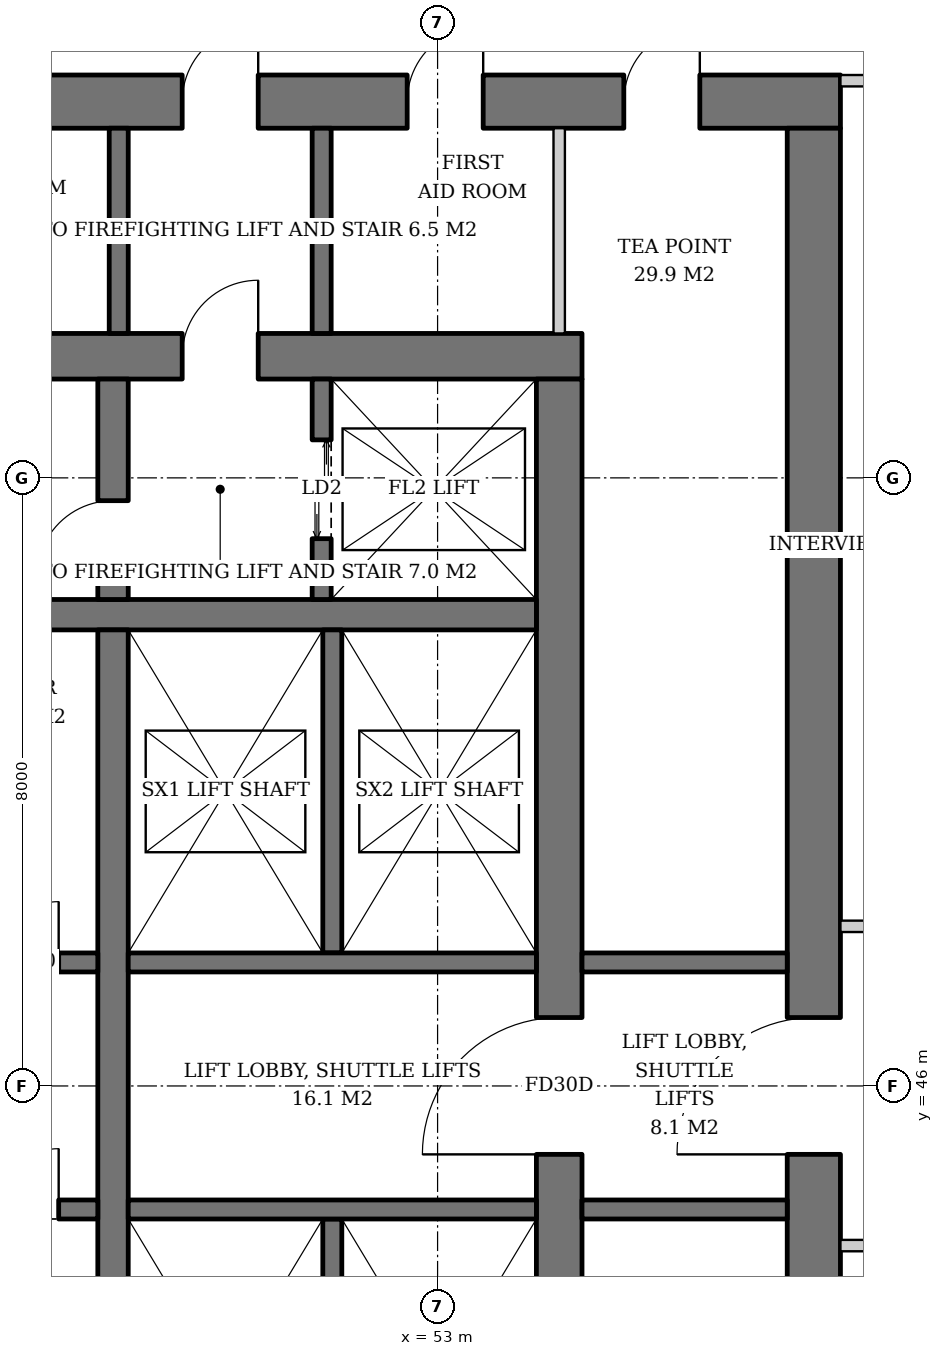
"""IFC4 building model, lengths in metres.
Left out: names, types, materials, properties, quantities, classifications, styles, units other than length and angle.
Written with IfcOpenShell. Run it as: python <this file> out.ifc"""

import sys

from ifc_helpers import new_model, si_unit, direction, frame, frame_2d, origin, place, context, subcontext, project, spatial, rectangle, extrude, element, fill, save


model = new_model("IFC4")
c1 = context("Model", 3, precision=1e-05, world=origin(), true_north=direction((0.0, 1.0)))
c2 = subcontext(c1, "Body", "Model", "MODEL_VIEW")
j1 = project(units=[si_unit("LENGTHUNIT", "METRE"), si_unit("PLANEANGLEUNIT", "RADIAN")], contexts=[c1])
p1 = place(None, origin())
s1 = spatial("IfcSite", under=j1, at=p1, CompositionType="ELEMENT")
p2 = place(p1, origin())
s2 = spatial("IfcBuilding", under=s1, at=p2, CompositionType="ELEMENT")
p3 = place(p2, frame((0.0, 0.0, 154.0)))
s3 = spatial("IfcBuildingStorey", under=s2, at=p3, CompositionType="ELEMENT", Elevation=154.0)
p4 = place(p3, frame((35.1, 55.6, 0.0), z_axis=(0.0, 0.0, 1.0), x_axis=(1.0, 0.0, 0.0)))
e1 = element("IfcWall", 1, at=p4, inside=s3, PredefinedType="SHEAR", context=c2, shape_type="SweptSolid", body=[
    extrude(rectangle(XDim=19.8, YDim=0.6, at=frame_2d((9.9, 0.0))), origin(), (0.0, 0.0, 1.0), 3.8),
])
p5 = place(p4, frame((14.54, 0.0, 0.0)))
e2 = element("IfcOpeningElement", 2, at=p5, cuts=e1, PredefinedType="OPENING", context=c2, shape_type="SweptSolid", body=[
    extrude(rectangle(XDim=1.0, YDim=2.1, at=frame_2d((0.5, 1.05))), frame((0.0, 0.31, 0.0), z_axis=(0.0, -1.0, 0.0), x_axis=(1.0, 0.0, 0.0)), (0.0, 0.0, 1.0), 0.62),
])
p6 = place(p4, frame((2.425, 0.0, 0.0)))
e3 = element("IfcOpeningElement", 3, at=p6, cuts=e1, PredefinedType="OPENING", context=c2, shape_type="SweptSolid", body=[
    extrude(rectangle(XDim=1.0, YDim=2.1, at=frame_2d((0.5, 1.05))), frame((0.0, 0.31, 0.0), z_axis=(0.0, -1.0, 0.0), x_axis=(1.0, 0.0, 0.0)), (0.0, 0.0, 1.0), 0.62),
])
p7 = place(p3, frame((54.6, 36.7, 0.0), z_axis=(0.0, 0.0, 1.0), x_axis=(0.0, 1.0, 0.0)))
e4 = element("IfcWall", 4, at=p7, inside=s3, PredefinedType="SHEAR", context=c2, shape_type="SweptSolid", body=[
    extrude(rectangle(XDim=18.6, YDim=0.6, at=frame_2d((9.3, 0.0))), origin(), (0.0, 0.0, 1.0), 3.8),
])
p8 = place(p7, frame((8.4, 0.0, 0.0)))
e5 = element("IfcOpeningElement", 5, at=p8, cuts=e4, PredefinedType="OPENING", context=c2, shape_type="SweptSolid", body=[
    extrude(rectangle(XDim=1.8, YDim=2.4, at=frame_2d((0.9, 1.2))), frame((0.0, 0.31, 0.0), z_axis=(0.0, -1.0, 0.0), x_axis=(1.0, 0.0, 0.0)), (0.0, 0.0, 1.0), 0.62),
])
p9 = place(p3, frame((31.7, 58.95, 0.0), z_axis=(0.0, 0.0, 1.0), x_axis=(1.0, 0.0, 0.0)))
e6 = element("IfcWall", 6, at=p9, inside=s3, PredefinedType="SHEAR", context=c2, shape_type="SweptSolid", body=[
    extrude(rectangle(XDim=26.6, YDim=0.7, at=frame_2d((13.3, 0.0))), origin(), (0.0, 0.0, 1.0), 3.8),
])
p10 = place(p9, frame((17.94, 0.0, 0.0)))
e7 = element("IfcOpeningElement", 7, at=p10, cuts=e6, PredefinedType="OPENING", context=c2, shape_type="SweptSolid", body=[
    extrude(rectangle(XDim=1.0, YDim=2.1, at=frame_2d((0.5, 1.05))), frame((0.0, 0.36, 0.0), z_axis=(0.0, -1.0, 0.0), x_axis=(1.0, 0.0, 0.0)), (0.0, 0.0, 1.0), 0.72),
])
p11 = place(p9, frame((5.825, 0.0, 0.0)))
e8 = element("IfcOpeningElement", 8, at=p11, cuts=e6, PredefinedType="OPENING", context=c2, shape_type="SweptSolid", body=[
    extrude(rectangle(XDim=1.0, YDim=2.1, at=frame_2d((0.5, 1.05))), frame((0.0, 0.36, 0.0), z_axis=(0.0, -1.0, 0.0), x_axis=(1.0, 0.0, 0.0)), (0.0, 0.0, 1.0), 0.72),
])
p12 = place(p9, frame((1.837, 0.0, 0.0)))
e9 = element("IfcOpeningElement", 9, at=p12, cuts=e6, PredefinedType="OPENING", context=c2, shape_type="SweptSolid", body=[
    extrude(rectangle(XDim=1.0, YDim=2.1, at=frame_2d((0.5, 1.05))), frame((0.0, 0.36, 0.0), z_axis=(0.0, -1.0, 0.0), x_axis=(1.0, 0.0, 0.0)), (0.0, 0.0, 1.0), 0.72),
])
p13 = place(p9, frame((3.781, 0.0, 0.0)))
e10 = element("IfcOpeningElement", 10, at=p13, cuts=e6, PredefinedType="OPENING", context=c2, shape_type="SweptSolid", body=[
    extrude(rectangle(XDim=1.0, YDim=2.1, at=frame_2d((0.5, 1.05))), frame((0.0, 0.36, 0.0), z_axis=(0.0, -1.0, 0.0), x_axis=(1.0, 0.0, 0.0)), (0.0, 0.0, 1.0), 0.72),
])
p14 = place(p9, frame((7.95, 0.0, 0.0)))
e11 = element("IfcOpeningElement", 11, at=p14, cuts=e6, PredefinedType="OPENING", context=c2, shape_type="SweptSolid", body=[
    extrude(rectangle(XDim=1.0, YDim=2.1, at=frame_2d((0.5, 1.05))), frame((0.0, 0.36, 0.0), z_axis=(0.0, -1.0, 0.0), x_axis=(1.0, 0.0, 0.0)), (0.0, 0.0, 1.0), 0.72),
])
p15 = place(p9, frame((11.038, 0.0, 0.0)))
e12 = element("IfcOpeningElement", 12, at=p15, cuts=e6, PredefinedType="OPENING", context=c2, shape_type="SweptSolid", body=[
    extrude(rectangle(XDim=1.0, YDim=2.1, at=frame_2d((0.5, 1.05))), frame((0.0, 0.36, 0.0), z_axis=(0.0, -1.0, 0.0), x_axis=(1.0, 0.0, 0.0)), (0.0, 0.0, 1.0), 0.72),
])
p16 = place(p9, frame((14.666, 0.0, 0.0)))
e13 = element("IfcOpeningElement", 13, at=p16, cuts=e6, PredefinedType="OPENING", context=c2, shape_type="SweptSolid", body=[
    extrude(rectangle(XDim=1.0, YDim=2.1, at=frame_2d((0.5, 1.05))), frame((0.0, 0.36, 0.0), z_axis=(0.0, -1.0, 0.0), x_axis=(1.0, 0.0, 0.0)), (0.0, 0.0, 1.0), 0.72),
])
p17 = place(p9, frame((20.9, 0.0, 0.0)))
e14 = element("IfcOpeningElement", 14, at=p17, cuts=e6, PredefinedType="OPENING", context=c2, shape_type="SweptSolid", body=[
    extrude(rectangle(XDim=1.0, YDim=2.1, at=frame_2d((0.5, 1.05))), frame((0.0, 0.36, 0.0), z_axis=(0.0, -1.0, 0.0), x_axis=(1.0, 0.0, 0.0)), (0.0, 0.0, 1.0), 0.72),
])
p18 = place(p9, frame((23.75, 0.0, 0.0)))
e15 = element("IfcOpeningElement", 15, at=p18, cuts=e6, PredefinedType="OPENING", context=c2, shape_type="SweptSolid", body=[
    extrude(rectangle(XDim=1.0, YDim=2.1, at=frame_2d((0.5, 1.05))), frame((0.0, 0.36, 0.0), z_axis=(0.0, -1.0, 0.0), x_axis=(1.0, 0.0, 0.0)), (0.0, 0.0, 1.0), 0.72),
])
p19 = place(p3, frame((57.95, 33.4, 0.0), z_axis=(0.0, 0.0, 1.0), x_axis=(0.0, 1.0, 0.0)))
e16 = element("IfcWall", 16, at=p19, inside=s3, PredefinedType="SHEAR", context=c2, shape_type="SweptSolid", body=[
    extrude(rectangle(XDim=25.2, YDim=0.7, at=frame_2d((12.6, 0.0))), origin(), (0.0, 0.0, 1.0), 3.8),
])
p20 = place(p19, frame((11.7, 0.0, 0.0)))
e17 = element("IfcOpeningElement", 17, at=p20, cuts=e16, PredefinedType="OPENING", context=c2, shape_type="SweptSolid", body=[
    extrude(rectangle(XDim=1.8, YDim=2.4, at=frame_2d((0.9, 1.2))), frame((0.0, 0.36, 0.0), z_axis=(0.0, -1.0, 0.0), x_axis=(1.0, 0.0, 0.0)), (0.0, 0.0, 1.0), 0.72),
])
p21 = place(p3, frame((35.7, 52.2, 0.0), z_axis=(0.0, 0.0, 1.0), x_axis=(1.0, 0.0, 0.0)))
e18 = element("IfcWall", 18, at=p21, inside=s3, PredefinedType="SHEAR", context=c2, shape_type="SweptSolid", body=[
    extrude(rectangle(XDim=18.6, YDim=0.4, at=frame_2d((9.3, 0.0))), origin(), (0.0, 0.0, 1.0), 3.8),
])
p22 = place(p3, frame((48.73, 40.0, 0.0), z_axis=(0.0, 0.0, 1.0), x_axis=(0.0, 1.0, 0.0)))
e19 = element("IfcWall", 19, at=p22, inside=s3, PredefinedType="SHEAR", context=c2, shape_type="SweptSolid", body=[
    extrude(rectangle(XDim=12.0, YDim=0.4, at=frame_2d((6.0, 0.0))), origin(), (0.0, 0.0, 1.0), 3.8),
])
p23 = place(p3, frame((48.73, 52.4, 0.0), z_axis=(0.0, 0.0, 1.0), x_axis=(0.0, 1.0, 0.0)))
e20 = element("IfcWall", 20, at=p23, inside=s3, PredefinedType="SHEAR", context=c2, shape_type="SweptSolid", body=[
    extrude(rectangle(XDim=2.9, YDim=0.4, at=frame_2d((1.45, 0.0))), origin(), (0.0, 0.0, 1.0), 3.8),
])
p24 = place(p23, frame((0.3, 0.0, 0.0)))
e21 = element("IfcOpeningElement", 21, at=p24, cuts=e20, PredefinedType="OPENING", context=c2, shape_type="SweptSolid", body=[
    extrude(rectangle(XDim=1.0, YDim=2.1, at=frame_2d((0.5, 1.05))), frame((0.0, 0.21, 0.0), z_axis=(0.0, -1.0, 0.0), x_axis=(1.0, 0.0, 0.0)), (0.0, 0.0, 1.0), 0.42),
])
p25 = place(p3, frame((51.475, 52.4, 0.0), z_axis=(0.0, 0.0, 1.0), x_axis=(0.0, 1.0, 0.0)))
e22 = element("IfcWall", 22, at=p25, inside=s3, PredefinedType="SHEAR", context=c2, shape_type="SweptSolid", body=[
    extrude(rectangle(XDim=2.9, YDim=0.25, at=frame_2d((1.45, 0.0))), origin(), (0.0, 0.0, 1.0), 3.8),
])
p26 = place(p25, frame((0.8, 0.0, 0.0)))
e23 = element("IfcOpeningElement", 23, at=p26, cuts=e22, PredefinedType="OPENING", context=c2, shape_type="SweptSolid", body=[
    extrude(rectangle(XDim=1.3, YDim=2.2, at=frame_2d((0.65, 1.1))), frame((0.0, 0.135, 0.0), z_axis=(0.0, -1.0, 0.0), x_axis=(1.0, 0.0, 0.0)), (0.0, 0.0, 1.0), 0.27),
])
p27 = place(p3, frame((35.7, 47.625, 0.0), z_axis=(0.0, 0.0, 1.0), x_axis=(1.0, 0.0, 0.0)))
e24 = element("IfcWall", 24, at=p27, inside=s3, PredefinedType="SHEAR", context=c2, shape_type="SweptSolid", body=[
    extrude(rectangle(XDim=12.83, YDim=0.25, at=frame_2d((6.415, 0.0))), origin(), (0.0, 0.0, 1.0), 3.8),
])
p28 = place(p27, frame((0.7, 0.0, 0.0)))
e25 = element("IfcOpeningElement", 25, at=p28, cuts=e24, PredefinedType="OPENING", context=c2, shape_type="SweptSolid", body=[
    extrude(rectangle(XDim=1.1, YDim=2.2, at=frame_2d((0.55, 1.1))), frame((0.0, 0.135, 0.0), z_axis=(0.0, -1.0, 0.0), x_axis=(1.0, 0.0, 0.0)), (0.0, 0.0, 1.0), 0.27),
])
p29 = place(p27, frame((3.45, 0.0, 0.0)))
e26 = element("IfcOpeningElement", 26, at=p29, cuts=e24, PredefinedType="OPENING", context=c2, shape_type="SweptSolid", body=[
    extrude(rectangle(XDim=1.1, YDim=2.2, at=frame_2d((0.55, 1.1))), frame((0.0, 0.135, 0.0), z_axis=(0.0, -1.0, 0.0), x_axis=(1.0, 0.0, 0.0)), (0.0, 0.0, 1.0), 0.27),
])
p30 = place(p27, frame((6.2, 0.0, 0.0)))
e27 = element("IfcOpeningElement", 27, at=p30, cuts=e24, PredefinedType="OPENING", context=c2, shape_type="SweptSolid", body=[
    extrude(rectangle(XDim=1.1, YDim=2.2, at=frame_2d((0.55, 1.1))), frame((0.0, 0.135, 0.0), z_axis=(0.0, -1.0, 0.0), x_axis=(1.0, 0.0, 0.0)), (0.0, 0.0, 1.0), 0.27),
])
p31 = place(p27, frame((8.95, 0.0, 0.0)))
e28 = element("IfcOpeningElement", 28, at=p31, cuts=e24, PredefinedType="OPENING", context=c2, shape_type="SweptSolid", body=[
    extrude(rectangle(XDim=1.1, YDim=2.2, at=frame_2d((0.55, 1.1))), frame((0.0, 0.135, 0.0), z_axis=(0.0, -1.0, 0.0), x_axis=(1.0, 0.0, 0.0)), (0.0, 0.0, 1.0), 0.27),
])
p32 = place(p27, frame((11.515, 0.0, 0.0)))
e29 = element("IfcOpeningElement", 29, at=p32, cuts=e24, PredefinedType="OPENING", context=c2, shape_type="SweptSolid", body=[
    extrude(rectangle(XDim=0.8, YDim=2.0, at=frame_2d((0.4, 1.0))), frame((0.0, 0.135, 0.0), z_axis=(0.0, -1.0, 0.0), x_axis=(1.0, 0.0, 0.0)), (0.0, 0.0, 1.0), 0.27),
])
p33 = place(p3, frame((35.7, 44.375, 0.0), z_axis=(0.0, 0.0, 1.0), x_axis=(1.0, 0.0, 0.0)))
e30 = element("IfcWall", 30, at=p33, inside=s3, PredefinedType="SHEAR", context=c2, shape_type="SweptSolid", body=[
    extrude(rectangle(XDim=12.83, YDim=0.25, at=frame_2d((6.415, 0.0))), origin(), (0.0, 0.0, 1.0), 3.8),
])
p34 = place(p33, frame((0.7, 0.0, 0.0)))
e31 = element("IfcOpeningElement", 31, at=p34, cuts=e30, PredefinedType="OPENING", context=c2, shape_type="SweptSolid", body=[
    extrude(rectangle(XDim=1.1, YDim=2.2, at=frame_2d((0.55, 1.1))), frame((0.0, 0.135, 0.0), z_axis=(0.0, -1.0, 0.0), x_axis=(1.0, 0.0, 0.0)), (0.0, 0.0, 1.0), 0.27),
])
p35 = place(p33, frame((3.45, 0.0, 0.0)))
e32 = element("IfcOpeningElement", 32, at=p35, cuts=e30, PredefinedType="OPENING", context=c2, shape_type="SweptSolid", body=[
    extrude(rectangle(XDim=1.1, YDim=2.2, at=frame_2d((0.55, 1.1))), frame((0.0, 0.135, 0.0), z_axis=(0.0, -1.0, 0.0), x_axis=(1.0, 0.0, 0.0)), (0.0, 0.0, 1.0), 0.27),
])
p36 = place(p33, frame((6.2, 0.0, 0.0)))
e33 = element("IfcOpeningElement", 33, at=p36, cuts=e30, PredefinedType="OPENING", context=c2, shape_type="SweptSolid", body=[
    extrude(rectangle(XDim=1.1, YDim=2.2, at=frame_2d((0.55, 1.1))), frame((0.0, 0.135, 0.0), z_axis=(0.0, -1.0, 0.0), x_axis=(1.0, 0.0, 0.0)), (0.0, 0.0, 1.0), 0.27),
])
p37 = place(p33, frame((8.95, 0.0, 0.0)))
e34 = element("IfcOpeningElement", 34, at=p37, cuts=e30, PredefinedType="OPENING", context=c2, shape_type="SweptSolid", body=[
    extrude(rectangle(XDim=1.1, YDim=2.2, at=frame_2d((0.55, 1.1))), frame((0.0, 0.135, 0.0), z_axis=(0.0, -1.0, 0.0), x_axis=(1.0, 0.0, 0.0)), (0.0, 0.0, 1.0), 0.27),
])
p38 = place(p33, frame((11.515, 0.0, 0.0)))
e35 = element("IfcOpeningElement", 35, at=p38, cuts=e30, PredefinedType="OPENING", context=c2, shape_type="SweptSolid", body=[
    extrude(rectangle(XDim=0.8, YDim=2.0, at=frame_2d((0.4, 1.0))), frame((0.0, 0.135, 0.0), z_axis=(0.0, -1.0, 0.0), x_axis=(1.0, 0.0, 0.0)), (0.0, 0.0, 1.0), 0.27),
])
p39 = place(p3, frame((51.615, 47.75, 0.0), z_axis=(0.0, 0.0, 1.0), x_axis=(0.0, 1.0, 0.0)))
e36 = element("IfcWall", 36, at=p39, inside=s3, PredefinedType="SHEAR", context=c2, shape_type="SweptSolid", body=[
    extrude(rectangle(XDim=4.25, YDim=0.25, at=frame_2d((2.125, 0.0))), origin(), (0.0, 0.0, 1.0), 3.8),
])
p40 = place(p3, frame((48.93, 47.625, 0.0), z_axis=(0.0, 0.0, 1.0), x_axis=(1.0, 0.0, 0.0)))
e37 = element("IfcWall", 37, at=p40, inside=s3, PredefinedType="SHEAR", context=c2, shape_type="SweptSolid", body=[
    extrude(rectangle(XDim=5.37, YDim=0.25, at=frame_2d((2.685, 0.0))), origin(), (0.0, 0.0, 1.0), 3.8),
])
p41 = place(p3, frame((51.615, 44.25, 0.0), z_axis=(0.0, 0.0, 1.0), x_axis=(0.0, -1.0, 0.0)))
e38 = element("IfcWall", 38, at=p41, inside=s3, PredefinedType="SHEAR", context=c2, shape_type="SweptSolid", body=[
    extrude(rectangle(XDim=4.25, YDim=0.25, at=frame_2d((2.125, 0.0))), origin(), (0.0, 0.0, 1.0), 3.8),
])
p42 = place(p3, frame((48.93, 44.375, 0.0), z_axis=(0.0, 0.0, 1.0), x_axis=(1.0, 0.0, 0.0)))
e39 = element("IfcWall", 39, at=p42, inside=s3, PredefinedType="SHEAR", context=c2, shape_type="SweptSolid", body=[
    extrude(rectangle(XDim=5.37, YDim=0.25, at=frame_2d((2.685, 0.0))), origin(), (0.0, 0.0, 1.0), 3.8),
])
for number, where, z_axis, x_axis in (
    (40, (48.805, 55.9, 0.0), (0.0, 0.0, 1.0), (0.0, 1.0, 0.0)),
    (41, (51.475, 55.9, 0.0), (0.0, 0.0, 1.0), (0.0, 1.0, 0.0)),
    (42, (54.9, 44.375, 0.0), (0.0, 0.0, 1.0), (1.0, 0.0, 0.0)),
    (43, (54.9, 47.625, 0.0), (0.0, 0.0, 1.0), (1.0, 0.0, 0.0)),
):
    element("IfcWall", number, at=place(p3, frame(where, z_axis=z_axis, x_axis=x_axis)), inside=s3, PredefinedType="SOLIDWALL", context=c2, shape_type="SweptSolid", body=[
        extrude(rectangle(XDim=2.7, YDim=0.25, at=frame_2d((1.35, 0.0))), origin(), (0.0, 0.0, 1.0), 3.52),
    ])
p43 = place(p3, frame((54.6, 55.9, 0.0), z_axis=(0.0, 0.0, 1.0), x_axis=(0.0, 1.0, 0.0)))
e44 = element("IfcWall", 44, at=p43, inside=s3, PredefinedType="SOLIDWALL", context=c2, shape_type="SweptSolid", body=[
    extrude(rectangle(XDim=2.7, YDim=0.15, at=frame_2d((1.35, 0.0))), origin(), (0.0, 0.0, 1.0), 3.52),
])
for number, where, z_axis, x_axis in (
    (45, (58.3, 43.9, 0.0), (0.0, 0.0, 1.0), (1.0, 0.0, 0.0)),
    (46, (58.3, 48.1, 0.0), (0.0, 0.0, 1.0), (1.0, 0.0, 0.0)),
    (47, (58.3, 59.225, 0.0), (0.0, 0.0, 1.0), (1.0, 0.0, 0.0)),
):
    element("IfcWall", number, at=place(p3, frame(where, z_axis=z_axis, x_axis=x_axis)), inside=s3, PredefinedType="PARTITIONING", context=c2, shape_type="SweptSolid", body=[
        extrude(rectangle(XDim=1.725, YDim=0.15, at=frame_2d((0.862, 0.0))), origin(), (0.0, 0.0, 1.0), 3.52),
    ])
p44 = place(p26, origin())
e48 = element("IfcDoor", 48, at=p44, inside=s3, OperationType="DOUBLE_DOOR_SLIDING", PredefinedType="DOOR", context=c2, shape_type="SweptSolid", body=[
    extrude(rectangle(XDim=1.3, YDim=2.2, at=frame_2d((0.65, 1.1))), frame((0.0, 0.025, 0.0), z_axis=(0.0, -1.0, 0.0), x_axis=(1.0, 0.0, 0.0)), (0.0, 0.0, 1.0), 0.05),
])
fill(e23, e48)
p45 = place(p32, origin())
e49 = element("IfcDoor", 49, at=p45, inside=s3, OperationType="SINGLE_SWING_RIGHT", PredefinedType="DOOR", context=c2, shape_type="SweptSolid", body=[
    extrude(rectangle(XDim=0.8, YDim=2.0, at=frame_2d((0.4, 1.0))), frame((0.0, 0.025, 0.0), z_axis=(0.0, -1.0, 0.0), x_axis=(1.0, 0.0, 0.0)), (0.0, 0.0, 1.0), 0.05),
])
fill(e29, e49)
p46 = place(p38, origin())
e50 = element("IfcDoor", 50, at=p46, inside=s3, OperationType="SINGLE_SWING_RIGHT", PredefinedType="DOOR", context=c2, shape_type="SweptSolid", body=[
    extrude(rectangle(XDim=0.8, YDim=2.0, at=frame_2d((0.4, 1.0))), frame((0.0, 0.025, 0.0), z_axis=(0.0, -1.0, 0.0), x_axis=(1.0, 0.0, 0.0)), (0.0, 0.0, 1.0), 0.05),
])
fill(e35, e50)
p47 = place(p24, origin())
e51 = element("IfcDoor", 51, at=p47, inside=s3, OperationType="SINGLE_SWING_LEFT", PredefinedType="DOOR", context=c2, shape_type="SweptSolid", body=[
    extrude(rectangle(XDim=1.0, YDim=2.1, at=frame_2d((0.5, 1.05))), frame((0.0, 0.025, 0.0), z_axis=(0.0, -1.0, 0.0), x_axis=(1.0, 0.0, 0.0)), (0.0, 0.0, 1.0), 0.05),
])
fill(e21, e51)
p48 = place(p5, origin())
e52 = element("IfcDoor", 52, at=p48, inside=s3, OperationType="SINGLE_SWING_RIGHT", PredefinedType="DOOR", context=c2, shape_type="SweptSolid", body=[
    extrude(rectangle(XDim=1.0, YDim=2.1, at=frame_2d((0.5, 1.05))), frame((0.0, 0.025, 0.0), z_axis=(0.0, -1.0, 0.0), x_axis=(1.0, 0.0, 0.0)), (0.0, 0.0, 1.0), 0.05),
])
fill(e2, e52)
p49 = place(p8, origin())
e53 = element("IfcDoor", 53, at=p49, inside=s3, OperationType="DOUBLE_DOOR_SINGLE_SWING", PredefinedType="DOOR", context=c2, shape_type="SweptSolid", body=[
    extrude(rectangle(XDim=1.8, YDim=2.4, at=frame_2d((0.9, 1.2))), frame((0.0, 0.025, 0.0), z_axis=(0.0, -1.0, 0.0), x_axis=(1.0, 0.0, 0.0)), (0.0, 0.0, 1.0), 0.05),
])
fill(e5, e53)
p50 = place(p20, origin())
e54 = element("IfcDoor", 54, at=p50, inside=s3, OperationType="DOUBLE_DOOR_SINGLE_SWING", PredefinedType="DOOR", context=c2, shape_type="SweptSolid", body=[
    extrude(rectangle(XDim=1.8, YDim=2.4, at=frame_2d((0.9, 1.2))), frame((0.0, 0.025, 0.0), z_axis=(0.0, -1.0, 0.0), x_axis=(1.0, 0.0, 0.0)), (0.0, 0.0, 1.0), 0.05),
])
fill(e17, e54)
p51 = place(p10, origin())
e55 = element("IfcDoor", 55, at=p51, inside=s3, OperationType="SINGLE_SWING_RIGHT", PredefinedType="DOOR", context=c2, shape_type="SweptSolid", body=[
    extrude(rectangle(XDim=1.0, YDim=2.1, at=frame_2d((0.5, 1.05))), frame((0.0, 0.025, 0.0), z_axis=(0.0, -1.0, 0.0), x_axis=(1.0, 0.0, 0.0)), (0.0, 0.0, 1.0), 0.05),
])
fill(e7, e55)
p52 = place(p17, origin())
e56 = element("IfcDoor", 56, at=p52, inside=s3, OperationType="SINGLE_SWING_RIGHT", PredefinedType="DOOR", context=c2, shape_type="SweptSolid", body=[
    extrude(rectangle(XDim=1.0, YDim=2.1, at=frame_2d((0.5, 1.05))), frame((0.0, -0.29, 0.0), z_axis=(0.0, -1.0, 0.0), x_axis=(1.0, 0.0, 0.0)), (0.0, 0.0, 1.0), 0.05),
])
fill(e14, e56)
p53 = place(p18, origin())
e57 = element("IfcDoor", 57, at=p53, inside=s3, OperationType="SINGLE_SWING_RIGHT", PredefinedType="DOOR", context=c2, shape_type="SweptSolid", body=[
    extrude(rectangle(XDim=1.0, YDim=2.1, at=frame_2d((0.5, 1.05))), frame((0.0, -0.29, 0.0), z_axis=(0.0, -1.0, 0.0), x_axis=(1.0, 0.0, 0.0)), (0.0, 0.0, 1.0), 0.05),
])
fill(e15, e57)
save(model, sys.argv[1])
